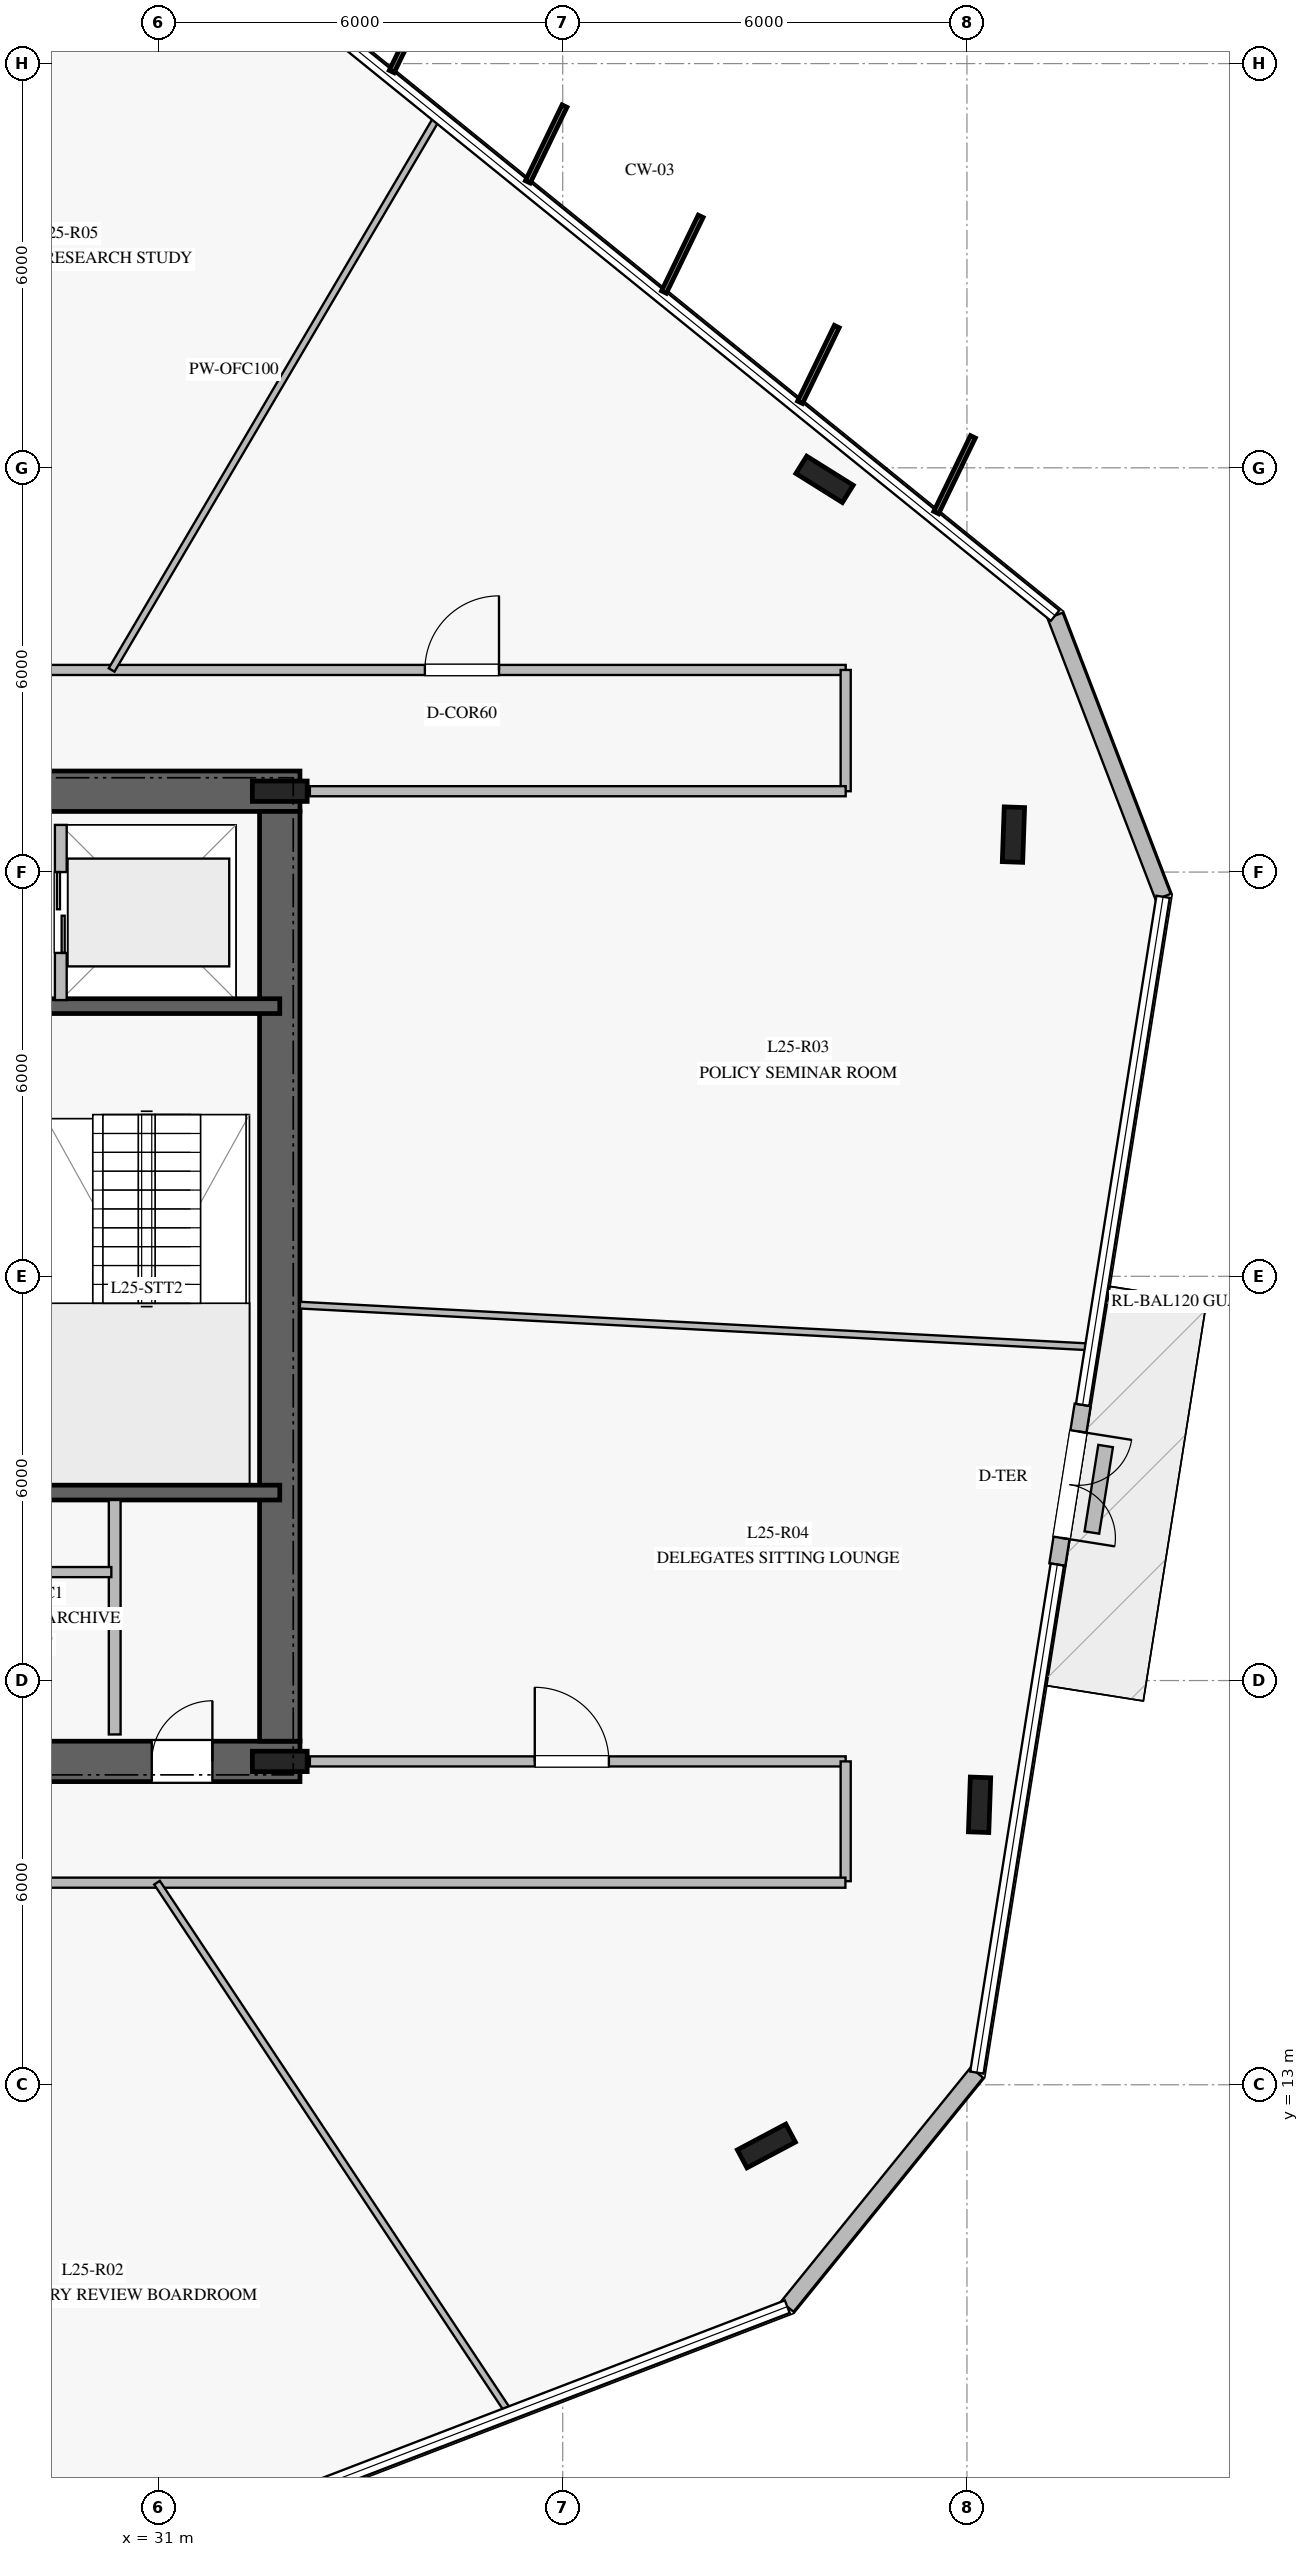
"""IFC4 building model, lengths in metres.
Left out: names, types, materials, properties, quantities, classifications, styles, units other than length and angle.
Written with IfcOpenShell. Run it as: python <this file> out.ifc"""

import sys

from ifc_helpers import new_model, si_unit, direction, frame, frame_2d, origin, origin_2d, place, context, subcontext, project, spatial, rectangle, i_section, extrude, element, fill, save


model = new_model("IFC4")
c1 = context("Model", 3, precision=1e-05, world=origin(), true_north=direction((0.0, 1.0)))
c2 = subcontext(c1, "Body", "Model", "MODEL_VIEW")
j1 = project(units=[si_unit("LENGTHUNIT", "METRE"), si_unit("PLANEANGLEUNIT", "RADIAN")], contexts=[c1])
p1 = place(None, origin())
s1 = spatial("IfcSite", under=j1, at=p1, CompositionType="ELEMENT")
p2 = place(p1, origin())
s2 = spatial("IfcBuilding", under=s1, at=p2, CompositionType="ELEMENT")
p3 = place(p2, frame((0.0, 0.0, 106.4)))
s3 = spatial("IfcBuildingStorey", under=s2, at=p3, CompositionType="ELEMENT", Elevation=106.4)
p4 = place(p3, frame((16.9, 17.8, 0.0), z_axis=(0.0, 0.0, 1.0), x_axis=(1.0, 0.0, 0.0)))
e1 = element("IfcWall", 1, at=p4, inside=s3, PredefinedType="SHEAR", context=c2, shape_type="SweptSolid", body=[
    extrude(rectangle(XDim=16.2, YDim=0.6, at=frame_2d((8.1, 0.0))), origin(), (0.0, 0.0, 1.0), 3.76),
])
p5 = place(p4, frame((5.05, 0.0, 0.0)))
e2 = element("IfcOpeningElement", 2, at=p5, cuts=e1, PredefinedType="OPENING", context=c2, shape_type="SweptSolid", body=[
    extrude(rectangle(XDim=1.2, YDim=2.25, at=frame_2d((0.6, 1.125))), frame((0.0, 0.31, 0.0), z_axis=(0.0, -1.0, 0.0), x_axis=(1.0, 0.0, 0.0)), (0.0, 0.0, 1.0), 0.62),
])
p6 = place(p4, frame((14.0, 0.0, 0.0)))
e3 = element("IfcOpeningElement", 3, at=p6, cuts=e1, PredefinedType="OPENING", context=c2, shape_type="SweptSolid", body=[
    extrude(rectangle(XDim=0.9, YDim=2.1, at=frame_2d((0.45, 1.05))), frame((0.0, 0.31, 0.0), z_axis=(0.0, -1.0, 0.0), x_axis=(1.0, 0.0, 0.0)), (0.0, 0.0, 1.0), 0.62),
])
p7 = place(p4, frame((9.875, 0.0, 0.0)))
e4 = element("IfcOpeningElement", 4, at=p7, cuts=e1, PredefinedType="OPENING", context=c2, shape_type="SweptSolid", body=[
    extrude(rectangle(XDim=1.1, YDim=2.2, at=frame_2d((0.55, 1.1))), frame((0.0, 0.31, 0.0), z_axis=(0.0, -1.0, 0.0), x_axis=(1.0, 0.0, 0.0)), (0.0, 0.0, 1.0), 0.62),
])
p8 = place(p3, frame((33.1, 32.2, 0.0), z_axis=(0.0, 0.0, 1.0), x_axis=(-1.0, 0.0, 0.0)))
e5 = element("IfcWall", 5, at=p8, inside=s3, PredefinedType="SHEAR", context=c2, shape_type="SweptSolid", body=[
    extrude(rectangle(XDim=16.2, YDim=0.6, at=frame_2d((8.1, 0.0))), origin(), (0.0, 0.0, 1.0), 3.76),
])
p9 = place(p8, frame((5.05, 0.0, 0.0)))
e6 = element("IfcOpeningElement", 6, at=p9, cuts=e5, PredefinedType="OPENING", context=c2, shape_type="SweptSolid", body=[
    extrude(rectangle(XDim=1.2, YDim=2.25, at=frame_2d((0.6, 1.125))), frame((0.0, 0.31, 0.0), z_axis=(0.0, -1.0, 0.0), x_axis=(1.0, 0.0, 0.0)), (0.0, 0.0, 1.0), 0.62),
])
p10 = place(p8, frame((11.85, 0.0, 0.0)))
e7 = element("IfcOpeningElement", 7, at=p10, cuts=e5, PredefinedType="OPENING", context=c2, shape_type="SweptSolid", body=[
    extrude(rectangle(XDim=1.1, YDim=2.2, at=frame_2d((0.55, 1.1))), frame((0.0, 0.31, 0.0), z_axis=(0.0, -1.0, 0.0), x_axis=(1.0, 0.0, 0.0)), (0.0, 0.0, 1.0), 0.62),
])
p11 = place(p8, frame((9.875, 0.0, 0.0)))
e8 = element("IfcOpeningElement", 8, at=p11, cuts=e5, PredefinedType="OPENING", context=c2, shape_type="SweptSolid", body=[
    extrude(rectangle(XDim=1.1, YDim=2.2, at=frame_2d((0.55, 1.1))), frame((0.0, 0.31, 0.0), z_axis=(0.0, -1.0, 0.0), x_axis=(1.0, 0.0, 0.0)), (0.0, 0.0, 1.0), 0.62),
])
p12 = place(p8, frame((7.9, 0.0, 0.0)))
e9 = element("IfcOpeningElement", 9, at=p12, cuts=e5, PredefinedType="OPENING", context=c2, shape_type="SweptSolid", body=[
    extrude(rectangle(XDim=1.1, YDim=2.2, at=frame_2d((0.55, 1.1))), frame((0.0, 0.31, 0.0), z_axis=(0.0, -1.0, 0.0), x_axis=(1.0, 0.0, 0.0)), (0.0, 0.0, 1.0), 0.62),
])
p13 = place(p3, frame((32.8, 18.1, 0.0), z_axis=(0.0, 0.0, 1.0), x_axis=(0.0, 1.0, 0.0)))
e10 = element("IfcWall", 10, at=p13, inside=s3, PredefinedType="SHEAR", context=c2, shape_type="SweptSolid", body=[
    extrude(rectangle(XDim=13.8, YDim=0.6, at=frame_2d((6.9, 0.0))), origin(), (0.0, 0.0, 1.0), 3.76),
])
for number, where, z_axis, x_axis in (
    (11, (32.8, 17.8, 0.0), (0.0, 0.0, 1.0), (1.0, 0.0, 0.0)),
    (12, (32.8, 32.2, 0.0), (0.0, 0.0, 1.0), (1.0, 0.0, 0.0)),
):
    element("IfcColumn", number, at=place(p3, frame(where, z_axis=z_axis, x_axis=x_axis)), inside=s3, PredefinedType="COLUMN", context=c2, shape_type="SweptSolid", body=[
        extrude(i_section(OverallWidth=0.303, OverallDepth=0.814, WebThickness=0.021, FlangeThickness=0.04, at=origin_2d()), origin(), (0.0, 0.0, 1.0), 4.0),
    ])
for number, where, z_axis, x_axis in (
    (13, (29.08, 21.79, 0.0), (0.0, 0.0, 1.0), (1.0, 0.0, 0.0)),
    (14, (29.08, 29.01, 0.0), (0.0, 0.0, 1.0), (1.0, 0.0, 0.0)),
):
    element("IfcWall", number, at=place(p3, frame(where, z_axis=z_axis, x_axis=x_axis)), inside=s3, PredefinedType="SOLIDWALL", context=c2, shape_type="SweptSolid", body=[
        extrude(rectangle(XDim=3.72, YDim=0.22, at=frame_2d((1.86, 0.0))), origin(), (0.0, 0.0, 1.0), 3.76),
    ])
for number, where, z_axis, x_axis in (
    (15, (40.886, 36.829, 0.0), (0.0, 0.0, 1.0), (-0.848, 0.53, 0.0)),
    (16, (40.023, 12.092, 0.0), (0.0, 0.0, 1.0), (0.883, 0.469, 0.0)),
    (17, (43.187, 17.156, 0.0), (0.0, 0.0, 1.0), (0.035, 0.999, 0.0)),
    (18, (43.69, 31.556, 0.0), (0.0, 0.0, 1.0), (0.035, 0.999, 0.0)),
):
    element("IfcColumn", number, at=place(p3, frame(where, z_axis=z_axis, x_axis=x_axis)), inside=s3, PredefinedType="COLUMN", context=c2, shape_type="SweptSolid", body=[
        extrude(i_section(OverallWidth=0.303, OverallDepth=0.814, WebThickness=0.021, FlangeThickness=0.04, at=origin_2d()), origin(), (0.0, 0.0, 1.0), 4.0),
    ])
p14 = place(p3, frame((40.333, 9.707, 0.0), z_axis=(0.0, 0.0, 1.0), x_axis=(0.629438558802, 0.777050256221, 0.0)))
e19 = element("IfcWall", 19, at=p14, inside=s3, PredefinedType="STANDARD", context=c2, shape_type="SweptSolid", body=[
    extrude(rectangle(XDim=4.471, YDim=0.24, at=frame_2d((2.235, 0.0))), origin(), (0.0, 0.0, 1.0), 3.76),
])
p15 = place(p3, frame((44.341, 20.722, 0.0), z_axis=(0.0, 0.0, 1.0), x_axis=(0.156673033509, 0.987650525526, 0.0)))
e20 = element("IfcWall", 20, at=p15, inside=s3, PredefinedType="STANDARD", context=c2, shape_type="SweptSolid", body=[
    extrude(rectangle(XDim=2.4, YDim=0.24, at=frame_2d((1.2, 0.0))), origin(), (0.0, 0.0, 1.0), 3.76),
])
p16 = place(p15, frame((0.4, 0.0, 0.0)))
e21 = element("IfcOpeningElement", 21, at=p16, cuts=e20, PredefinedType="OPENING", context=c2, shape_type="SweptSolid", body=[
    extrude(rectangle(XDim=1.6, YDim=2.25, at=frame_2d((0.8, 1.125))), frame((0.0, 0.13, 0.0), z_axis=(0.0, -1.0, 0.0), x_axis=(1.0, 0.0, 0.0)), (0.0, 0.0, 1.0), 0.26),
])
p17 = place(p3, frame((45.911, 30.633, 0.0), z_axis=(0.0, 0.0, 1.0), x_axis=(-0.35848504637, 0.933535468811, 0.0)))
e22 = element("IfcWall", 22, at=p17, inside=s3, PredefinedType="STANDARD", context=c2, shape_type="SweptSolid", body=[
    extrude(rectangle(XDim=4.471, YDim=0.24, at=frame_2d((2.235, 0.0))), origin(), (0.0, 0.0, 1.0), 3.76),
])
p18 = place(p3, frame((44.854, 21.197, 0.0), z_axis=(0.0, 0.0, 1.0), x_axis=(0.156994330722, 0.987599503909, 0.0)))
e23 = element("IfcWall", 23, at=p18, inside=s3, PredefinedType="USERDEFINED", context=c2, shape_type="SweptSolid", body=[
    extrude(rectangle(XDim=1.3, YDim=0.22, at=frame_2d((0.65, 0.0))), origin(), (0.0, 0.0, 1.0), 0.4),
])
p19 = place(p3, frame((30.35, 18.2, 0.0), z_axis=(0.0, 0.0, 1.0), x_axis=(0.0, 1.0, 0.0)))
e24 = element("IfcWall", 24, at=p19, inside=s3, PredefinedType="PARTITIONING", context=c2, shape_type="SweptSolid", body=[
    extrude(rectangle(XDim=3.48, YDim=0.175, at=frame_2d((1.74, 0.0))), origin(), (0.0, 0.0, 1.0), 3.76),
])
p20 = place(p3, frame((24.4, 20.61, 0.0), z_axis=(0.0, 0.0, 1.0), x_axis=(1.0, 0.0, 0.0)))
e25 = element("IfcWall", 25, at=p20, inside=s3, PredefinedType="PARTITIONING", context=c2, shape_type="SweptSolid", body=[
    extrude(rectangle(XDim=5.9, YDim=0.15, at=frame_2d((2.95, 0.0))), origin(), (0.0, 0.0, 1.0), 3.76),
])
p21 = place(p3, frame((29.55, 29.1, 0.0), z_axis=(0.0, 0.0, 1.0), x_axis=(0.0, 1.0, 0.0)))
e26 = element("IfcWall", 26, at=p21, inside=s3, PredefinedType="PARTITIONING", context=c2, shape_type="SweptSolid", body=[
    extrude(rectangle(XDim=2.6, YDim=0.175, at=frame_2d((1.3, 0.0))), origin(), (0.0, 0.0, 1.0), 3.76),
])
p22 = place(p21, frame((0.7, 0.0, 0.0)))
e27 = element("IfcOpeningElement", 27, at=p22, cuts=e26, PredefinedType="OPENING", context=c2, shape_type="SweptSolid", body=[
    extrude(rectangle(XDim=1.2, YDim=2.2, at=frame_2d((0.6, 1.1))), frame((0.0, 0.098, 0.0), z_axis=(0.0, -1.0, 0.0), x_axis=(1.0, 0.0, 0.0)), (0.0, 0.0, 1.0), 0.195),
])
p23 = place(p3, frame((25.95, 34.0, 0.0), z_axis=(0.0, 0.0, 1.0), x_axis=(1.0, 0.0, 0.0)))
e28 = element("IfcWall", 28, at=p23, inside=s3, PredefinedType="PARTITIONING", context=c2, shape_type="SweptSolid", body=[
    extrude(rectangle(XDim=15.25, YDim=0.15, at=frame_2d((7.625, 0.0))), origin(), (0.0, 0.0, 1.0), 3.21),
])
p24 = place(p23, frame((9.004, 0.0, 0.0)))
e29 = element("IfcOpeningElement", 29, at=p24, cuts=e28, PredefinedType="OPENING", context=c2, shape_type="SweptSolid", body=[
    extrude(rectangle(XDim=1.1, YDim=2.2, at=frame_2d((0.55, 1.1))), frame((0.0, 0.085, 0.0), z_axis=(0.0, -1.0, 0.0), x_axis=(1.0, 0.0, 0.0)), (0.0, 0.0, 1.0), 0.17),
])
p25 = place(p3, frame((41.2, 34.0, 0.0), z_axis=(0.0, 0.0, 1.0), x_axis=(0.0, -1.0, 0.0)))
e30 = element("IfcWall", 30, at=p25, inside=s3, PredefinedType="PARTITIONING", context=c2, shape_type="SweptSolid", body=[
    extrude(rectangle(XDim=1.8, YDim=0.15, at=frame_2d((0.9, 0.0))), origin(), (0.0, 0.0, 1.0), 3.76),
])
p26 = place(p3, frame((41.2, 32.2, 0.0), z_axis=(0.0, 0.0, 1.0), x_axis=(-1.0, 0.0, 0.0)))
e31 = element("IfcWall", 31, at=p26, inside=s3, PredefinedType="PARTITIONING", context=c2, shape_type="SweptSolid", body=[
    extrude(rectangle(XDim=7.953, YDim=0.15, at=frame_2d((3.977, 0.0))), origin(), (0.0, 0.0, 1.0), 3.21),
])
p27 = place(p3, frame((33.247, 17.8, 0.0), z_axis=(0.0, 0.0, 1.0), x_axis=(1.0, 0.0, 0.0)))
e32 = element("IfcWall", 32, at=p27, inside=s3, PredefinedType="PARTITIONING", context=c2, shape_type="SweptSolid", body=[
    extrude(rectangle(XDim=7.953, YDim=0.15, at=frame_2d((3.977, 0.0))), origin(), (0.0, 0.0, 1.0), 3.21),
])
p28 = place(p27, frame((3.338, 0.0, 0.0)))
e33 = element("IfcOpeningElement", 33, at=p28, cuts=e32, PredefinedType="OPENING", context=c2, shape_type="SweptSolid", body=[
    extrude(rectangle(XDim=1.1, YDim=2.2, at=frame_2d((0.55, 1.1))), frame((0.0, 0.085, 0.0), z_axis=(0.0, -1.0, 0.0), x_axis=(1.0, 0.0, 0.0)), (0.0, 0.0, 1.0), 0.17),
])
p29 = place(p3, frame((41.2, 17.8, 0.0), z_axis=(0.0, 0.0, 1.0), x_axis=(0.0, -1.0, 0.0)))
e34 = element("IfcWall", 34, at=p29, inside=s3, PredefinedType="PARTITIONING", context=c2, shape_type="SweptSolid", body=[
    extrude(rectangle(XDim=1.778, YDim=0.15, at=frame_2d((0.889, 0.0))), origin(), (0.0, 0.0, 1.0), 3.21),
])
p30 = place(p3, frame((41.196, 16.0, 0.0), z_axis=(0.0, 0.0, 1.0), x_axis=(-1.0, 0.0, 0.0)))
e35 = element("IfcWall", 35, at=p30, inside=s3, PredefinedType="PARTITIONING", context=c2, shape_type="SweptSolid", body=[
    extrude(rectangle(XDim=15.246, YDim=0.15, at=frame_2d((7.623, 0.0))), origin(), (0.0, 0.0, 1.0), 3.21),
])
p31 = place(p30, frame((11.885, 0.0, 0.0)))
e36 = element("IfcOpeningElement", 36, at=p31, cuts=e35, PredefinedType="OPENING", context=c2, shape_type="SweptSolid", body=[
    extrude(rectangle(XDim=1.1, YDim=2.2, at=frame_2d((0.55, 1.1))), frame((0.0, 0.085, 0.0), z_axis=(0.0, -1.0, 0.0), x_axis=(1.0, 0.0, 0.0)), (0.0, 0.0, 1.0), 0.17),
])
p32 = place(p3, frame((30.304, 34.0, 0.0), z_axis=(0.0, 0.0, 1.0), x_axis=(0.507715403699, 0.861524850975, 0.0)))
e37 = element("IfcWall", 37, at=p32, inside=s3, PredefinedType="MOVABLE", context=c2, shape_type="SweptSolid", body=[
    extrude(rectangle(XDim=9.527, YDim=0.1, at=frame_2d((4.764, 0.0))), origin(), (0.0, 0.0, 1.0), 3.16),
])
p33 = place(p3, frame((30.978, 16.0, 0.0), z_axis=(0.0, 0.0, 1.0), x_axis=(0.553320396836, -0.832968509876, 0.0)))
e38 = element("IfcWall", 38, at=p33, inside=s3, PredefinedType="MOVABLE", context=c2, shape_type="SweptSolid", body=[
    extrude(rectangle(XDim=9.438, YDim=0.1, at=frame_2d((4.719, 0.0))), origin(), (0.0, 0.0, 1.0), 3.05),
])
p34 = place(p3, frame((33.1, 24.572, 0.0), z_axis=(0.0, 0.0, 1.0), x_axis=(0.998606672966, -0.052770377176, 0.0)))
e39 = element("IfcWall", 39, at=p34, inside=s3, PredefinedType="MOVABLE", context=c2, shape_type="SweptSolid", body=[
    extrude(rectangle(XDim=11.751, YDim=0.1, at=frame_2d((5.875, 0.0))), origin(), (0.0, 0.0, 1.0), 3.16),
])
p35 = place(p16, frame((1.6, 0.0, 0.0), z_axis=(0.0, 0.0, 1.0), x_axis=(-1.0, 0.0, 0.0)))
e40 = element("IfcDoor", 40, at=p35, inside=s3, OperationType="DOUBLE_DOOR_SINGLE_SWING", PredefinedType="DOOR", context=c2, shape_type="SweptSolid", body=[
    extrude(rectangle(XDim=1.6, YDim=2.25, at=frame_2d((0.8, 1.125))), frame((0.0, 0.025, 0.0), z_axis=(0.0, -1.0, 0.0), x_axis=(1.0, 0.0, 0.0)), (0.0, 0.0, 1.0), 0.05),
])
fill(e21, e40)
p36 = place(p6, origin())
e41 = element("IfcDoor", 41, at=p36, inside=s3, OperationType="SINGLE_SWING_RIGHT", PredefinedType="DOOR", context=c2, shape_type="SweptSolid", body=[
    extrude(rectangle(XDim=0.9, YDim=2.1, at=frame_2d((0.45, 1.05))), frame((0.0, 0.025, 0.0), z_axis=(0.0, -1.0, 0.0), x_axis=(1.0, 0.0, 0.0)), (0.0, 0.0, 1.0), 0.05),
])
fill(e3, e41)
p37 = place(p22, origin())
e42 = element("IfcDoor", 42, at=p37, inside=s3, OperationType="DOUBLE_DOOR_SLIDING", PredefinedType="DOOR", context=c2, shape_type="SweptSolid", body=[
    extrude(rectangle(XDim=1.2, YDim=2.2, at=frame_2d((0.6, 1.1))), frame((0.0, 0.025, 0.0), z_axis=(0.0, -1.0, 0.0), x_axis=(1.0, 0.0, 0.0)), (0.0, 0.0, 1.0), 0.05),
])
fill(e27, e42)
p38 = place(p24, origin())
e43 = element("IfcDoor", 43, at=p38, inside=s3, OperationType="SINGLE_SWING_RIGHT", PredefinedType="DOOR", context=c2, shape_type="SweptSolid", body=[
    extrude(rectangle(XDim=1.1, YDim=2.2, at=frame_2d((0.55, 1.1))), frame((0.0, 0.025, 0.0), z_axis=(0.0, -1.0, 0.0), x_axis=(1.0, 0.0, 0.0)), (0.0, 0.0, 1.0), 0.05),
])
fill(e29, e43)
p39 = place(p28, origin())
e44 = element("IfcDoor", 44, at=p39, inside=s3, OperationType="SINGLE_SWING_LEFT", PredefinedType="DOOR", context=c2, shape_type="SweptSolid", body=[
    extrude(rectangle(XDim=1.1, YDim=2.2, at=frame_2d((0.55, 1.1))), frame((0.0, 0.025, 0.0), z_axis=(0.0, -1.0, 0.0), x_axis=(1.0, 0.0, 0.0)), (0.0, 0.0, 1.0), 0.05),
])
fill(e33, e44)
save(model, sys.argv[1])
